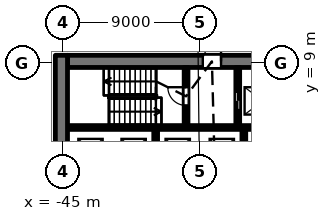
"""IFC4 building model, lengths in metres.
Left out: names, types, materials, properties, quantities, classifications, styles, units other than length and angle.
Written with IfcOpenShell. Run it as: python <this file> out.ifc"""

import sys

from ifc_helpers import new_model, si_unit, direction, frame, frame_2d, origin, place, context, subcontext, project, spatial, rectangle, extrude, element, fill, save


model = new_model("IFC4")
c1 = context("Model", 3, precision=1e-05, world=origin(), true_north=direction((0.0, 1.0)))
c2 = subcontext(c1, "Body", "Model", "MODEL_VIEW")
j1 = project(units=[si_unit("LENGTHUNIT", "METRE"), si_unit("PLANEANGLEUNIT", "RADIAN")], contexts=[c1])
p1 = place(None, origin())
s1 = spatial("IfcSite", under=j1, at=p1, CompositionType="ELEMENT")
p2 = place(p1, origin())
s2 = spatial("IfcBuilding", under=s1, at=p2, CompositionType="ELEMENT")
p3 = place(p2, origin())
s3 = spatial("IfcBuildingStorey", under=s2, at=p3, CompositionType="ELEMENT", Elevation=0.0)
p4 = place(p3, frame((-44.7, 4.75, 0.0), z_axis=(0.0, 0.0, 1.0), x_axis=(1.0, 0.0, 0.0)))
e1 = element("IfcWall", 1, at=p4, inside=s3, PredefinedType="SHEAR", context=c2, shape_type="SweptSolid", body=[
    extrude(rectangle(XDim=17.4, YDim=0.25, at=frame_2d((8.7, 0.0))), origin(), (0.0, 0.0, 1.0), 6.9),
])
p5 = place(p3, frame((-44.7, 9.1, 0.0), z_axis=(0.0, 0.0, 1.0), x_axis=(1.0, 0.0, 0.0)))
e2 = element("IfcWall", 2, at=p5, inside=s3, PredefinedType="SHEAR", context=c2, shape_type="SweptSolid", body=[
    extrude(rectangle(XDim=17.4, YDim=0.8, at=frame_2d((8.7, 0.0))), origin(), (0.0, 0.0, 1.0), 6.9),
])
p6 = place(p5, frame((8.9, 0.0, 0.0)))
e3 = element("IfcOpeningElement", 3, at=p6, cuts=e2, PredefinedType="OPENING", context=c2, shape_type="SweptSolid", body=[
    extrude(rectangle(XDim=1.2, YDim=2.1, at=frame_2d((0.6, 1.05))), frame((0.0, 0.41, 0.0), z_axis=(0.0, -1.0, 0.0), x_axis=(1.0, 0.0, 0.0)), (0.0, 0.0, 1.0), 0.82),
])
p7 = place(p5, frame((14.6, 0.0, 0.0)))
e4 = element("IfcOpeningElement", 4, at=p7, cuts=e2, PredefinedType="OPENING", context=c2, shape_type="SweptSolid", body=[
    extrude(rectangle(XDim=0.9, YDim=2.1, at=frame_2d((0.45, 1.05))), frame((0.0, 0.41, 0.0), z_axis=(0.0, -1.0, 0.0), x_axis=(1.0, 0.0, 0.0)), (0.0, 0.0, 1.0), 0.82),
])
p8 = place(p5, frame((16.1, 0.0, 0.0)))
e5 = element("IfcOpeningElement", 5, at=p8, cuts=e2, PredefinedType="OPENING", context=c2, shape_type="SweptSolid", body=[
    extrude(rectangle(XDim=0.9, YDim=2.1, at=frame_2d((0.45, 1.05))), frame((0.0, 0.41, 0.0), z_axis=(0.0, -1.0, 0.0), x_axis=(1.0, 0.0, 0.0)), (0.0, 0.0, 1.0), 0.82),
])
p9 = place(p3, frame((-45.1, -9.5, 0.0), z_axis=(0.0, 0.0, 1.0), x_axis=(0.0, 1.0, 0.0)))
e6 = element("IfcWall", 6, at=p9, inside=s3, PredefinedType="SHEAR", context=c2, shape_type="SweptSolid", body=[
    extrude(rectangle(XDim=19.0, YDim=0.8, at=frame_2d((9.5, 0.0))), origin(), (0.0, 0.0, 1.0), 6.9),
])
p10 = place(p9, frame((8.3, 0.0, 0.0)))
e7 = element("IfcOpeningElement", 7, at=p10, cuts=e6, PredefinedType="OPENING", context=c2, shape_type="SweptSolid", body=[
    extrude(rectangle(XDim=2.4, YDim=2.1, at=frame_2d((1.2, 1.05))), frame((0.0, 0.41, 0.0), z_axis=(0.0, -1.0, 0.0), x_axis=(1.0, 0.0, 0.0)), (0.0, 0.0, 1.0), 0.82),
])
p11 = place(p3, frame((-38.9, 2.0, 0.0), z_axis=(0.0, 0.0, 1.0), x_axis=(0.0, 1.0, 0.0)))
e8 = element("IfcWall", 8, at=p11, inside=s3, PredefinedType="SHEAR", context=c2, shape_type="SweptSolid", body=[
    extrude(rectangle(XDim=2.625, YDim=0.25, at=frame_2d((1.312, 0.0))), origin(), (0.0, 0.0, 1.0), 6.9),
])
p12 = place(p3, frame((-36.9, 4.875, 0.0), z_axis=(0.0, 0.0, 1.0), x_axis=(0.0, 1.0, 0.0)))
e9 = element("IfcWall", 9, at=p12, inside=s3, PredefinedType="SHEAR", context=c2, shape_type="SweptSolid", body=[
    extrude(rectangle(XDim=3.825, YDim=0.25, at=frame_2d((1.913, 0.0))), origin(), (0.0, 0.0, 1.0), 6.9),
])
p13 = place(p12, frame((1.325, 0.0, 0.0)))
e10 = element("IfcOpeningElement", 10, at=p13, cuts=e9, PredefinedType="OPENING", context=c2, shape_type="SweptSolid", body=[
    extrude(rectangle(XDim=1.2, YDim=2.1, at=frame_2d((0.6, 1.05))), frame((0.0, 0.135, 0.0), z_axis=(0.0, -1.0, 0.0), x_axis=(1.0, 0.0, 0.0)), (0.0, 0.0, 1.0), 0.27),
])
p14 = place(p3, frame((-33.5, 4.875, 0.0), z_axis=(0.0, 0.0, 1.0), x_axis=(0.0, 1.0, 0.0)))
e11 = element("IfcWall", 11, at=p14, inside=s3, PredefinedType="SHEAR", context=c2, shape_type="SweptSolid", body=[
    extrude(rectangle(XDim=3.825, YDim=0.25, at=frame_2d((1.913, 0.0))), origin(), (0.0, 0.0, 1.0), 6.9),
])
p15 = place(p14, frame((1.025, 0.0, 0.0)))
e12 = element("IfcOpeningElement", 12, at=p15, cuts=e11, PredefinedType="OPENING", context=c2, shape_type="SweptSolid", body=[
    extrude(rectangle(XDim=1.2, YDim=2.1, at=frame_2d((0.6, 1.05))), frame((0.0, 0.135, 0.0), z_axis=(0.0, -1.0, 0.0), x_axis=(1.0, 0.0, 0.0)), (0.0, 0.0, 1.0), 0.27),
])
p16 = place(p3, frame((-33.1, 2.0, 0.0), z_axis=(0.0, 0.0, 1.0), x_axis=(0.0, 1.0, 0.0)))
e13 = element("IfcWall", 13, at=p16, inside=s3, PredefinedType="SHEAR", context=c2, shape_type="SweptSolid", body=[
    extrude(rectangle(XDim=2.625, YDim=0.25, at=frame_2d((1.312, 0.0))), origin(), (0.0, 0.0, 1.0), 6.9),
])
p17 = place(p15, origin())
e14 = element("IfcDoor", 14, at=p17, inside=s3, OperationType="SLIDING_TO_LEFT", PredefinedType="DOOR", context=c2, shape_type="SweptSolid", body=[
    extrude(rectangle(XDim=1.2, YDim=2.1, at=frame_2d((0.6, 1.05))), frame((0.0, 0.025, 0.0), z_axis=(0.0, -1.0, 0.0), x_axis=(1.0, 0.0, 0.0)), (0.0, 0.0, 1.0), 0.05),
])
fill(e12, e14)
p18 = place(p13, origin())
e15 = element("IfcDoor", 15, at=p18, inside=s3, OperationType="SINGLE_SWING_RIGHT", PredefinedType="DOOR", context=c2, shape_type="SweptSolid", body=[
    extrude(rectangle(XDim=1.2, YDim=2.1, at=frame_2d((0.6, 1.05))), frame((0.0, 0.025, 0.0), z_axis=(0.0, -1.0, 0.0), x_axis=(1.0, 0.0, 0.0)), (0.0, 0.0, 1.0), 0.05),
])
fill(e10, e15)
p19 = place(p6, origin())
e16 = element("IfcDoor", 16, at=p19, inside=s3, OperationType="SINGLE_SWING_RIGHT", PredefinedType="DOOR", context=c2, shape_type="SweptSolid", body=[
    extrude(rectangle(XDim=1.2, YDim=2.1, at=frame_2d((0.6, 1.05))), frame((0.0, -0.225, 0.0), z_axis=(0.0, -1.0, 0.0), x_axis=(1.0, 0.0, 0.0)), (0.0, 0.0, 1.0), 0.05),
])
fill(e3, e16)
save(model, sys.argv[1])
